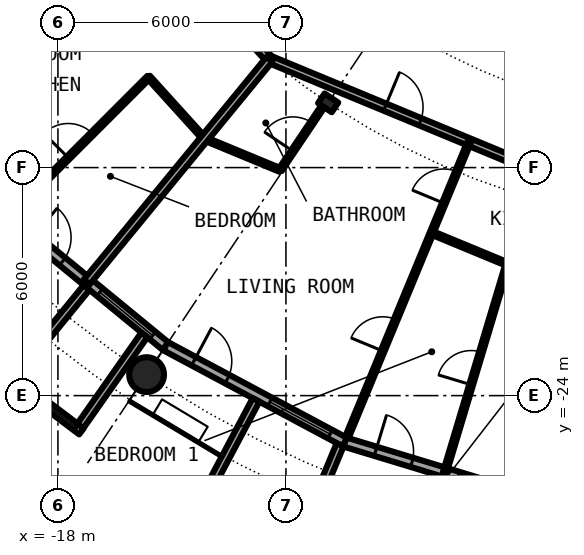
"""IFC4 building model, lengths in metres.
Left out: names, types, materials, properties, quantities, classifications, styles, units other than length and angle.
Written with IfcOpenShell. Run it as: python <this file> out.ifc"""

import sys

from ifc_helpers import new_model, si_unit, direction, frame, frame_2d, origin, origin_2d, place, context, subcontext, project, spatial, rectangle, circle, hollow_circle, i_section, extrude, element, fill, save


model = new_model("IFC4")
c1 = context("Model", 3, precision=1e-05, world=origin(), true_north=direction((0.0, 1.0)))
c2 = subcontext(c1, "Body", "Model", "MODEL_VIEW")
j1 = project(units=[si_unit("LENGTHUNIT", "METRE"), si_unit("PLANEANGLEUNIT", "RADIAN")], contexts=[c1])
p1 = place(None, origin())
s1 = spatial("IfcSite", under=j1, at=p1, CompositionType="ELEMENT")
p2 = place(p1, origin())
s2 = spatial("IfcBuilding", under=s1, at=p2, CompositionType="ELEMENT")
p3 = place(p2, frame((0.0, 0.0, 120.8)))
s3 = spatial("IfcBuildingStorey", under=s2, at=p3, CompositionType="ELEMENT", Elevation=120.8)
p4 = place(p3, frame((-15.667, -23.448, 0.0), z_axis=(0.0, 0.0, 1.0), x_axis=(1.0, 0.0, 0.0)))
e1 = element("IfcColumn", 1, at=p4, inside=s3, PredefinedType="COLUMN", context=c2, shape_type="SweptSolid", body=[
    extrude(hollow_circle(Radius=0.457, WallThickness=0.04, at=origin_2d()), origin(), (0.0, 0.0, 1.0), 3.05),
])
p5 = place(p3, frame((-10.889, -16.297, 0.0), z_axis=(0.0, 0.0, 1.0), x_axis=(-0.55557023302, -0.831469612303, 0.0)))
e2 = element("IfcColumn", 2, at=p5, inside=s3, PredefinedType="COLUMN", context=c2, shape_type="SweptSolid", body=[
    extrude(i_section(OverallWidth=0.307, OverallDepth=0.432, WebThickness=0.021, FlangeThickness=0.04, FilletRadius=0.027, at=origin_2d()), origin(), (0.0, 0.0, 1.0), 3.05),
])
p6 = place(p3, frame((-19.304, -19.304, 0.0), z_axis=(0.0, 0.0, 1.0), x_axis=(0.773019449054, -0.634382322723, 0.0)))
e3 = element("IfcWall", 3, at=p6, inside=s3, PredefinedType="SOLIDWALL", context=c2, shape_type="SweptSolid", body=[
    extrude(rectangle(XDim=5.352, YDim=0.25, at=frame_2d((2.676, 0.0))), origin(), (0.0, 0.0, 1.0), 2.7),
])
p7 = place(p6, frame((0.841, 0.0, 0.0)))
e4 = element("IfcOpeningElement", 4, at=p7, cuts=e3, PredefinedType="OPENING", context=c2, shape_type="SweptSolid", body=[
    extrude(rectangle(XDim=1.0, YDim=2.2, at=frame_2d((0.5, 1.1))), frame((0.0, 0.135, 0.0), z_axis=(0.0, -1.0, 0.0), x_axis=(1.0, 0.0, 0.0)), (0.0, 0.0, 1.0), 0.27),
])
p8 = place(p6, frame((3.111, 0.0, 0.3)))
e5 = element("IfcOpeningElement", 5, at=p8, cuts=e3, PredefinedType="OPENING", context=c2, shape_type="SweptSolid", body=[
    extrude(rectangle(XDim=1.8, YDim=2.1, at=frame_2d((0.9, 1.05))), frame((0.0, 0.135, 0.0), z_axis=(0.0, -1.0, 0.0), x_axis=(1.0, 0.0, 0.0)), (0.0, 0.0, 1.0), 0.27),
])
p9 = place(p3, frame((-19.289, -23.497, -0.03), z_axis=(0.0, 0.0, 1.0), x_axis=(0.797456837111, -0.603375996329, 0.0)))
e6 = element("IfcWall", 6, at=p9, inside=s3, PredefinedType="SOLIDWALL", context=c2, shape_type="SweptSolid", body=[
    extrude(rectangle(XDim=2.391, YDim=0.2, at=frame_2d((1.196, 0.0))), origin(), (0.0, 0.0, 1.0), 2.73),
])
p10 = place(p9, frame((0.156, 0.0, 0.33)))
e7 = element("IfcOpeningElement", 7, at=p10, cuts=e6, PredefinedType="OPENING", context=c2, shape_type="SweptSolid", body=[
    extrude(circle(Radius=1.04, at=frame_2d((1.04, 1.04))), frame((0.0, 0.11, 0.0), z_axis=(0.0, -1.0, 0.0), x_axis=(1.0, 0.0, 0.0)), (0.0, 0.0, 1.0), 0.22),
])
p11 = place(p3, frame((-17.246, -21.155, -0.03), z_axis=(0.0, 0.0, 1.0), x_axis=(-0.631741648902, -0.775179004516, 0.0)))
e8 = element("IfcWall", 8, at=p11, inside=s3, PredefinedType="SOLIDWALL", context=c2, shape_type="SweptSolid", body=[
    extrude(rectangle(XDim=3.006, YDim=0.2, at=frame_2d((1.503, 0.0))), origin(), (0.0, 0.0, 1.0), 2.73),
])
p12 = place(p3, frame((-15.726, -22.402, -0.03), z_axis=(0.0, 0.0, 1.0), x_axis=(-0.574826383135, -0.818275399393, 0.0)))
e9 = element("IfcWall", 9, at=p12, inside=s3, PredefinedType="SOLIDWALL", context=c2, shape_type="SweptSolid", body=[
    extrude(rectangle(XDim=2.929, YDim=0.2, at=frame_2d((1.465, 0.0))), origin(), (0.0, 0.0, 1.0), 2.73),
])
p13 = place(p3, frame((-15.167, -22.699, 0.0), z_axis=(0.0, 0.0, 1.0), x_axis=(0.881915646801, -0.471407246368, 0.0)))
e10 = element("IfcWall", 10, at=p13, inside=s3, PredefinedType="SOLIDWALL", context=c2, shape_type="SweptSolid", body=[
    extrude(rectangle(XDim=5.352, YDim=0.25, at=frame_2d((2.676, 0.0))), origin(), (0.0, 0.0, 1.0), 2.7),
])
p14 = place(p13, frame((0.841, 0.0, 0.0)))
e11 = element("IfcOpeningElement", 11, at=p14, cuts=e10, PredefinedType="OPENING", context=c2, shape_type="SweptSolid", body=[
    extrude(rectangle(XDim=1.0, YDim=2.2, at=frame_2d((0.5, 1.1))), frame((0.0, 0.135, 0.0), z_axis=(0.0, -1.0, 0.0), x_axis=(1.0, 0.0, 0.0)), (0.0, 0.0, 1.0), 0.27),
])
p15 = place(p13, frame((3.111, 0.0, 0.3)))
e12 = element("IfcOpeningElement", 12, at=p15, cuts=e10, PredefinedType="OPENING", context=c2, shape_type="SweptSolid", body=[
    extrude(rectangle(XDim=1.8, YDim=2.1, at=frame_2d((0.9, 1.05))), frame((0.0, 0.135, 0.0), z_axis=(0.0, -1.0, 0.0), x_axis=(1.0, 0.0, 0.0)), (0.0, 0.0, 1.0), 0.27),
])
p16 = place(p3, frame((-12.787, -24.113, -0.03), z_axis=(0.0, 0.0, 1.0), x_axis=(-0.468365282436, -0.883534924159, 0.0)))
e13 = element("IfcWall", 13, at=p16, inside=s3, PredefinedType="SOLIDWALL", context=c2, shape_type="SweptSolid", body=[
    extrude(rectangle(XDim=3.006, YDim=0.2, at=frame_2d((1.503, 0.0))), origin(), (0.0, 0.0, 1.0), 2.73),
])
p17 = place(p3, frame((-10.575, -25.295, -0.03), z_axis=(0.0, 0.0, 1.0), x_axis=(-0.385697364644, -0.922625353492, 0.0)))
e14 = element("IfcWall", 14, at=p17, inside=s3, PredefinedType="SOLIDWALL", context=c2, shape_type="SweptSolid", body=[
    extrude(rectangle(XDim=2.883, YDim=0.2, at=frame_2d((1.442, 0.0))), origin(), (0.0, 0.0, 1.0), 2.73),
])
p18 = place(p3, frame((-10.447, -25.222, 0.0), z_axis=(0.0, 0.0, 1.0), x_axis=(0.956965678721, -0.290201119486, 0.0)))
e15 = element("IfcWall", 15, at=p18, inside=s3, PredefinedType="SOLIDWALL", context=c2, shape_type="SweptSolid", body=[
    extrude(rectangle(XDim=5.351, YDim=0.25, at=frame_2d((2.676, 0.0))), origin(), (0.0, 0.0, 1.0), 2.7),
])
p19 = place(p18, frame((0.841, 0.0, 0.0)))
e16 = element("IfcOpeningElement", 16, at=p19, cuts=e15, PredefinedType="OPENING", context=c2, shape_type="SweptSolid", body=[
    extrude(rectangle(XDim=1.0, YDim=2.2, at=frame_2d((0.5, 1.1))), frame((0.0, 0.135, 0.0), z_axis=(0.0, -1.0, 0.0), x_axis=(1.0, 0.0, 0.0)), (0.0, 0.0, 1.0), 0.27),
])
p20 = place(p18, frame((3.111, 0.0, 0.3)))
e17 = element("IfcOpeningElement", 17, at=p20, cuts=e15, PredefinedType="OPENING", context=c2, shape_type="SweptSolid", body=[
    extrude(rectangle(XDim=1.8, YDim=2.1, at=frame_2d((0.9, 1.05))), frame((0.0, 0.135, 0.0), z_axis=(0.0, -1.0, 0.0), x_axis=(1.0, 0.0, 0.0)), (0.0, 0.0, 1.0), 0.27),
])
p21 = place(p3, frame((-15.617, -15.617, 0.0), z_axis=(0.0, 0.0, 1.0), x_axis=(0.671144831591, -0.741326254107, 0.0)))
e18 = element("IfcWall", 18, at=p21, inside=s3, PredefinedType="PARTITIONING", context=c2, shape_type="SweptSolid", body=[
    extrude(rectangle(XDim=2.181, YDim=0.1, at=frame_2d((1.091, 0.0))), origin(), (0.0, 0.0, 1.0), 2.7),
])
p22 = place(p3, frame((-14.147, -17.238, 0.0), z_axis=(0.0, 0.0, 1.0), x_axis=(0.923874819588, -0.382694810171, 0.0)))
e19 = element("IfcWall", 19, at=p22, inside=s3, PredefinedType="PARTITIONING", context=c2, shape_type="SweptSolid", body=[
    extrude(rectangle(XDim=2.158, YDim=0.1, at=frame_2d((1.079, 0.0))), origin(), (0.0, 0.0, 1.0), 2.7),
])
p23 = place(p3, frame((-8.164, -19.716, 0.0), z_axis=(0.0, 0.0, 1.0), x_axis=(0.92387253274, -0.38270033087, 0.0)))
e20 = element("IfcWall", 20, at=p23, inside=s3, PredefinedType="PARTITIONING", context=c2, shape_type="SweptSolid", body=[
    extrude(rectangle(XDim=6.475, YDim=0.1, at=frame_2d((3.238, 0.0))), origin(), (0.0, 0.0, 1.0), 2.7),
])
p24 = place(p3, frame((-16.192, -11.004, 0.0), z_axis=(0.0, 0.0, 1.0), x_axis=(0.671481997275, -0.741020868354, 0.0)))
e21 = element("IfcWall", 21, at=p24, inside=s3, PredefinedType="PARTITIONING", context=c2, shape_type="SweptSolid", body=[
    extrude(rectangle(XDim=5.596, YDim=0.2, at=frame_2d((2.798, 0.0))), origin(), (0.0, 0.0, 1.0), 2.39),
])
p25 = place(p24, frame((3.179, 0.0, 0.0)))
e22 = element("IfcOpeningElement", 22, at=p25, cuts=e21, PredefinedType="OPENING", context=c2, shape_type="SweptSolid", body=[
    extrude(rectangle(XDim=1.0, YDim=2.3, at=frame_2d((0.5, 1.15))), frame((0.0, 0.11, 0.0), z_axis=(0.0, -1.0, 0.0), x_axis=(1.0, 0.0, 0.0)), (0.0, 0.0, 1.0), 0.22),
])
p26 = place(p3, frame((-12.434, -15.151, 0.0), z_axis=(0.0, 0.0, 1.0), x_axis=(0.923888467236, -0.382661861319, 0.0)))
e23 = element("IfcWall", 23, at=p26, inside=s3, PredefinedType="PARTITIONING", context=c2, shape_type="SweptSolid", body=[
    extrude(rectangle(XDim=11.381, YDim=0.2, at=frame_2d((5.691, 0.0))), origin(), (0.0, 0.0, 1.0), 2.7),
])
p27 = place(p26, frame((3.292, 0.0, 0.0)))
e24 = element("IfcOpeningElement", 24, at=p27, cuts=e23, PredefinedType="OPENING", context=c2, shape_type="SweptSolid", body=[
    extrude(rectangle(XDim=1.0, YDim=2.3, at=frame_2d((0.5, 1.15))), frame((0.0, 0.11, 0.0), z_axis=(0.0, -1.0, 0.0), x_axis=(1.0, 0.0, 0.0)), (0.0, 0.0, 1.0), 0.22),
])
p28 = place(p3, frame((-14.051, -9.391, 0.0), z_axis=(0.0, 0.0, 1.0), x_axis=(0.857768591583, -0.514036033069, 0.0)))
e25 = element("IfcWall", 25, at=p28, inside=s3, PredefinedType="PARTITIONING", context=c2, shape_type="SweptSolid", body=[
    extrude(rectangle(XDim=14.45, YDim=0.2, at=frame_2d((7.225, 0.0))), origin(), (0.0, 0.0, 1.0), 2.7),
])
p29 = place(p28, frame((9.133, 0.0, 0.0)))
e26 = element("IfcOpeningElement", 26, at=p29, cuts=e25, PredefinedType="OPENING", context=c2, shape_type="SweptSolid", body=[
    extrude(rectangle(XDim=1.0, YDim=2.3, at=frame_2d((0.5, 1.15))), frame((0.0, 0.11, 0.0), z_axis=(0.0, -1.0, 0.0), x_axis=(1.0, 0.0, 0.0)), (0.0, 0.0, 1.0), 0.22),
])
p30 = place(p3, frame((-22.595, -15.097, 0.0), z_axis=(0.0, 0.0, 1.0), x_axis=(0.831467903109, 0.555572791, 0.0)))
e27 = element("IfcWall", 27, at=p30, inside=s3, PredefinedType="PARTITIONING", context=c2, shape_type="SweptSolid", body=[
    extrude(rectangle(XDim=7.358, YDim=0.2, at=frame_2d((3.679, 0.0))), origin(), (0.0, 0.0, 1.0), 2.7),
])
p31 = place(p3, frame((-19.21, -19.222, 0.0), z_axis=(0.0, 0.0, 1.0), x_axis=(0.706914880313, 0.707298629994, 0.0)))
e28 = element("IfcWall", 28, at=p31, inside=s3, PredefinedType="PARTITIONING", context=c2, shape_type="SweptSolid", body=[
    extrude(rectangle(XDim=5.09, YDim=0.1, at=frame_2d((2.545, 0.0))), origin(), (0.0, 0.0, 1.0), 2.7),
])
p32 = place(p31, frame((2.095, 0.0, 0.0)))
e29 = element("IfcOpeningElement", 29, at=p32, cuts=e28, PredefinedType="OPENING", context=c2, shape_type="SweptSolid", body=[
    extrude(rectangle(XDim=0.9, YDim=2.3, at=frame_2d((0.45, 1.15))), frame((0.0, 0.06, 0.0), z_axis=(0.0, -1.0, 0.0), x_axis=(1.0, 0.0, 0.0)), (0.0, 0.0, 1.0), 0.12),
])
p33 = place(p3, frame((-17.24, -21.007, 0.0), z_axis=(0.0, 0.0, 1.0), x_axis=(0.634381303318, 0.773020285633, 0.0)))
e30 = element("IfcWall", 30, at=p33, inside=s3, PredefinedType="PARTITIONING", context=c2, shape_type="SweptSolid", body=[
    extrude(rectangle(XDim=7.576, YDim=0.2, at=frame_2d((3.788, 0.0))), origin(), (0.0, 0.0, 1.0), 2.7),
])
p34 = place(p3, frame((-12.153, -18.064, 0.0), z_axis=(0.0, 0.0, 1.0), x_axis=(0.557893831879, 0.829912328112, 0.0)))
e31 = element("IfcWall", 31, at=p34, inside=s3, PredefinedType="PARTITIONING", context=c2, shape_type="SweptSolid", body=[
    extrude(rectangle(XDim=1.956, YDim=0.1, at=frame_2d((0.978, 0.0))), origin(), (0.0, 0.0, 1.0), 2.7),
])
p35 = place(p34, frame((0.6, 0.0, 0.0)))
e32 = element("IfcOpeningElement", 32, at=p35, cuts=e31, PredefinedType="OPENING", context=c2, shape_type="SweptSolid", body=[
    extrude(rectangle(XDim=0.9, YDim=2.3, at=frame_2d((0.45, 1.15))), frame((0.0, 0.06, 0.0), z_axis=(0.0, -1.0, 0.0), x_axis=(1.0, 0.0, 0.0)), (0.0, 0.0, 1.0), 0.12),
])
p36 = place(p3, frame((-10.399, -25.106, 0.0), z_axis=(0.0, 0.0, 1.0), x_axis=(0.382697543868, 0.923873687209, 0.0)))
e33 = element("IfcWall", 33, at=p36, inside=s3, PredefinedType="PARTITIONING", context=c2, shape_type="SweptSolid", body=[
    extrude(rectangle(XDim=8.419, YDim=0.1, at=frame_2d((4.209, 0.0))), origin(), (0.0, 0.0, 1.0), 2.7),
])
p37 = place(p36, frame((6.677, 0.0, 0.0)))
e34 = element("IfcOpeningElement", 34, at=p37, cuts=e33, PredefinedType="OPENING", context=c2, shape_type="SweptSolid", body=[
    extrude(rectangle(XDim=0.9, YDim=2.3, at=frame_2d((0.45, 1.15))), frame((0.0, 0.06, 0.0), z_axis=(0.0, -1.0, 0.0), x_axis=(1.0, 0.0, 0.0)), (0.0, 0.0, 1.0), 0.12),
])
p38 = place(p36, frame((2.468, 0.0, 0.0)))
e35 = element("IfcOpeningElement", 35, at=p38, cuts=e33, PredefinedType="OPENING", context=c2, shape_type="SweptSolid", body=[
    extrude(rectangle(XDim=0.9, YDim=2.3, at=frame_2d((0.45, 1.15))), frame((0.0, 0.06, 0.0), z_axis=(0.0, -1.0, 0.0), x_axis=(1.0, 0.0, 0.0)), (0.0, 0.0, 1.0), 0.12),
])
p39 = place(p3, frame((-7.821, -26.025, 0.0), z_axis=(0.0, 0.0, 1.0), x_axis=(0.287793773423, 0.957692405723, 0.0)))
e36 = element("IfcWall", 36, at=p39, inside=s3, PredefinedType="PARTITIONING", context=c2, shape_type="SweptSolid", body=[
    extrude(rectangle(XDim=5.726, YDim=0.1, at=frame_2d((2.863, 0.0))), origin(), (0.0, 0.0, 1.0), 2.7),
])
p40 = place(p39, frame((2.413, 0.0, 0.0)))
e37 = element("IfcOpeningElement", 37, at=p40, cuts=e36, PredefinedType="OPENING", context=c2, shape_type="SweptSolid", body=[
    extrude(rectangle(XDim=0.9, YDim=2.3, at=frame_2d((0.45, 1.15))), frame((0.0, 0.06, 0.0), z_axis=(0.0, -1.0, 0.0), x_axis=(1.0, 0.0, 0.0)), (0.0, 0.0, 1.0), 0.12),
])
p41 = place(p7, origin())
e38 = element("IfcDoor", 38, at=p41, inside=s3, OperationType="SINGLE_SWING_LEFT", PredefinedType="DOOR", context=c2, shape_type="SweptSolid", body=[
    extrude(rectangle(XDim=1.0, YDim=2.2, at=frame_2d((0.5, 1.1))), frame((0.0, 0.025, 0.0), z_axis=(0.0, -1.0, 0.0), x_axis=(1.0, 0.0, 0.0)), (0.0, 0.0, 1.0), 0.05),
])
fill(e4, e38)
p42 = place(p8, origin())
e39 = element("IfcWindow", 39, at=p42, inside=s3, PartitioningType="SINGLE_PANEL", PredefinedType="WINDOW", context=c2, shape_type="SweptSolid", body=[
    extrude(rectangle(XDim=1.8, YDim=2.1, at=frame_2d((0.9, 1.05))), frame((0.0, 0.03, 0.0), z_axis=(0.0, -1.0, 0.0), x_axis=(1.0, 0.0, 0.0)), (0.0, 0.0, 1.0), 0.06),
])
fill(e5, e39)
p43 = place(p10, origin())
e40 = element("IfcWindow", 40, at=p43, inside=s3, PartitioningType="SINGLE_PANEL", PredefinedType="WINDOW", context=c2, shape_type="SweptSolid", body=[
    extrude(circle(Radius=1.04, at=frame_2d((1.04, 1.04))), frame((0.0, 0.03, 0.0), z_axis=(0.0, -1.0, 0.0), x_axis=(1.0, 0.0, 0.0)), (0.0, 0.0, 1.0), 0.06),
])
fill(e7, e40)
p44 = place(p14, origin())
e41 = element("IfcDoor", 41, at=p44, inside=s3, OperationType="SINGLE_SWING_LEFT", PredefinedType="DOOR", context=c2, shape_type="SweptSolid", body=[
    extrude(rectangle(XDim=1.0, YDim=2.2, at=frame_2d((0.5, 1.1))), frame((0.0, 0.025, 0.0), z_axis=(0.0, -1.0, 0.0), x_axis=(1.0, 0.0, 0.0)), (0.0, 0.0, 1.0), 0.05),
])
fill(e11, e41)
p45 = place(p15, origin())
e42 = element("IfcWindow", 42, at=p45, inside=s3, PartitioningType="SINGLE_PANEL", PredefinedType="WINDOW", context=c2, shape_type="SweptSolid", body=[
    extrude(rectangle(XDim=1.8, YDim=2.1, at=frame_2d((0.9, 1.05))), frame((0.0, 0.03, 0.0), z_axis=(0.0, -1.0, 0.0), x_axis=(1.0, 0.0, 0.0)), (0.0, 0.0, 1.0), 0.06),
])
fill(e12, e42)
p46 = place(p19, origin())
e43 = element("IfcDoor", 43, at=p46, inside=s3, OperationType="SINGLE_SWING_LEFT", PredefinedType="DOOR", context=c2, shape_type="SweptSolid", body=[
    extrude(rectangle(XDim=1.0, YDim=2.2, at=frame_2d((0.5, 1.1))), frame((0.0, 0.025, 0.0), z_axis=(0.0, -1.0, 0.0), x_axis=(1.0, 0.0, 0.0)), (0.0, 0.0, 1.0), 0.05),
])
fill(e16, e43)
p47 = place(p32, origin())
e44 = element("IfcDoor", 44, at=p47, inside=s3, OperationType="SINGLE_SWING_RIGHT", PredefinedType="DOOR", context=c2, shape_type="SweptSolid", body=[
    extrude(rectangle(XDim=0.9, YDim=2.3, at=frame_2d((0.45, 1.15))), frame((0.0, 0.025, 0.0), z_axis=(0.0, -1.0, 0.0), x_axis=(1.0, 0.0, 0.0)), (0.0, 0.0, 1.0), 0.05),
])
fill(e29, e44)
p48 = place(p27, origin())
e45 = element("IfcDoor", 45, at=p48, inside=s3, OperationType="SINGLE_SWING_LEFT", PredefinedType="DOOR", context=c2, shape_type="SweptSolid", body=[
    extrude(rectangle(XDim=1.0, YDim=2.3, at=frame_2d((0.5, 1.15))), frame((0.0, 0.025, 0.0), z_axis=(0.0, -1.0, 0.0), x_axis=(1.0, 0.0, 0.0)), (0.0, 0.0, 1.0), 0.05),
])
fill(e24, e45)
p49 = place(p35, origin())
e46 = element("IfcDoor", 46, at=p49, inside=s3, OperationType="SINGLE_SWING_RIGHT", PredefinedType="DOOR", context=c2, shape_type="SweptSolid", body=[
    extrude(rectangle(XDim=0.9, YDim=2.3, at=frame_2d((0.45, 1.15))), frame((0.0, 0.025, 0.0), z_axis=(0.0, -1.0, 0.0), x_axis=(1.0, 0.0, 0.0)), (0.0, 0.0, 1.0), 0.05),
])
fill(e32, e46)
p50 = place(p37, origin())
e47 = element("IfcDoor", 47, at=p50, inside=s3, OperationType="SINGLE_SWING_RIGHT", PredefinedType="DOOR", context=c2, shape_type="SweptSolid", body=[
    extrude(rectangle(XDim=0.9, YDim=2.3, at=frame_2d((0.45, 1.15))), frame((0.0, 0.025, 0.0), z_axis=(0.0, -1.0, 0.0), x_axis=(1.0, 0.0, 0.0)), (0.0, 0.0, 1.0), 0.05),
])
fill(e34, e47)
p51 = place(p38, origin())
e48 = element("IfcDoor", 48, at=p51, inside=s3, OperationType="SINGLE_SWING_LEFT", PredefinedType="DOOR", context=c2, shape_type="SweptSolid", body=[
    extrude(rectangle(XDim=0.9, YDim=2.3, at=frame_2d((0.45, 1.15))), frame((0.0, 0.025, 0.0), z_axis=(0.0, -1.0, 0.0), x_axis=(1.0, 0.0, 0.0)), (0.0, 0.0, 1.0), 0.05),
])
fill(e35, e48)
p52 = place(p40, origin())
e49 = element("IfcDoor", 49, at=p52, inside=s3, OperationType="SINGLE_SWING_LEFT", PredefinedType="DOOR", context=c2, shape_type="SweptSolid", body=[
    extrude(rectangle(XDim=0.9, YDim=2.3, at=frame_2d((0.45, 1.15))), frame((0.0, 0.025, 0.0), z_axis=(0.0, -1.0, 0.0), x_axis=(1.0, 0.0, 0.0)), (0.0, 0.0, 1.0), 0.05),
])
fill(e37, e49)
save(model, sys.argv[1])
